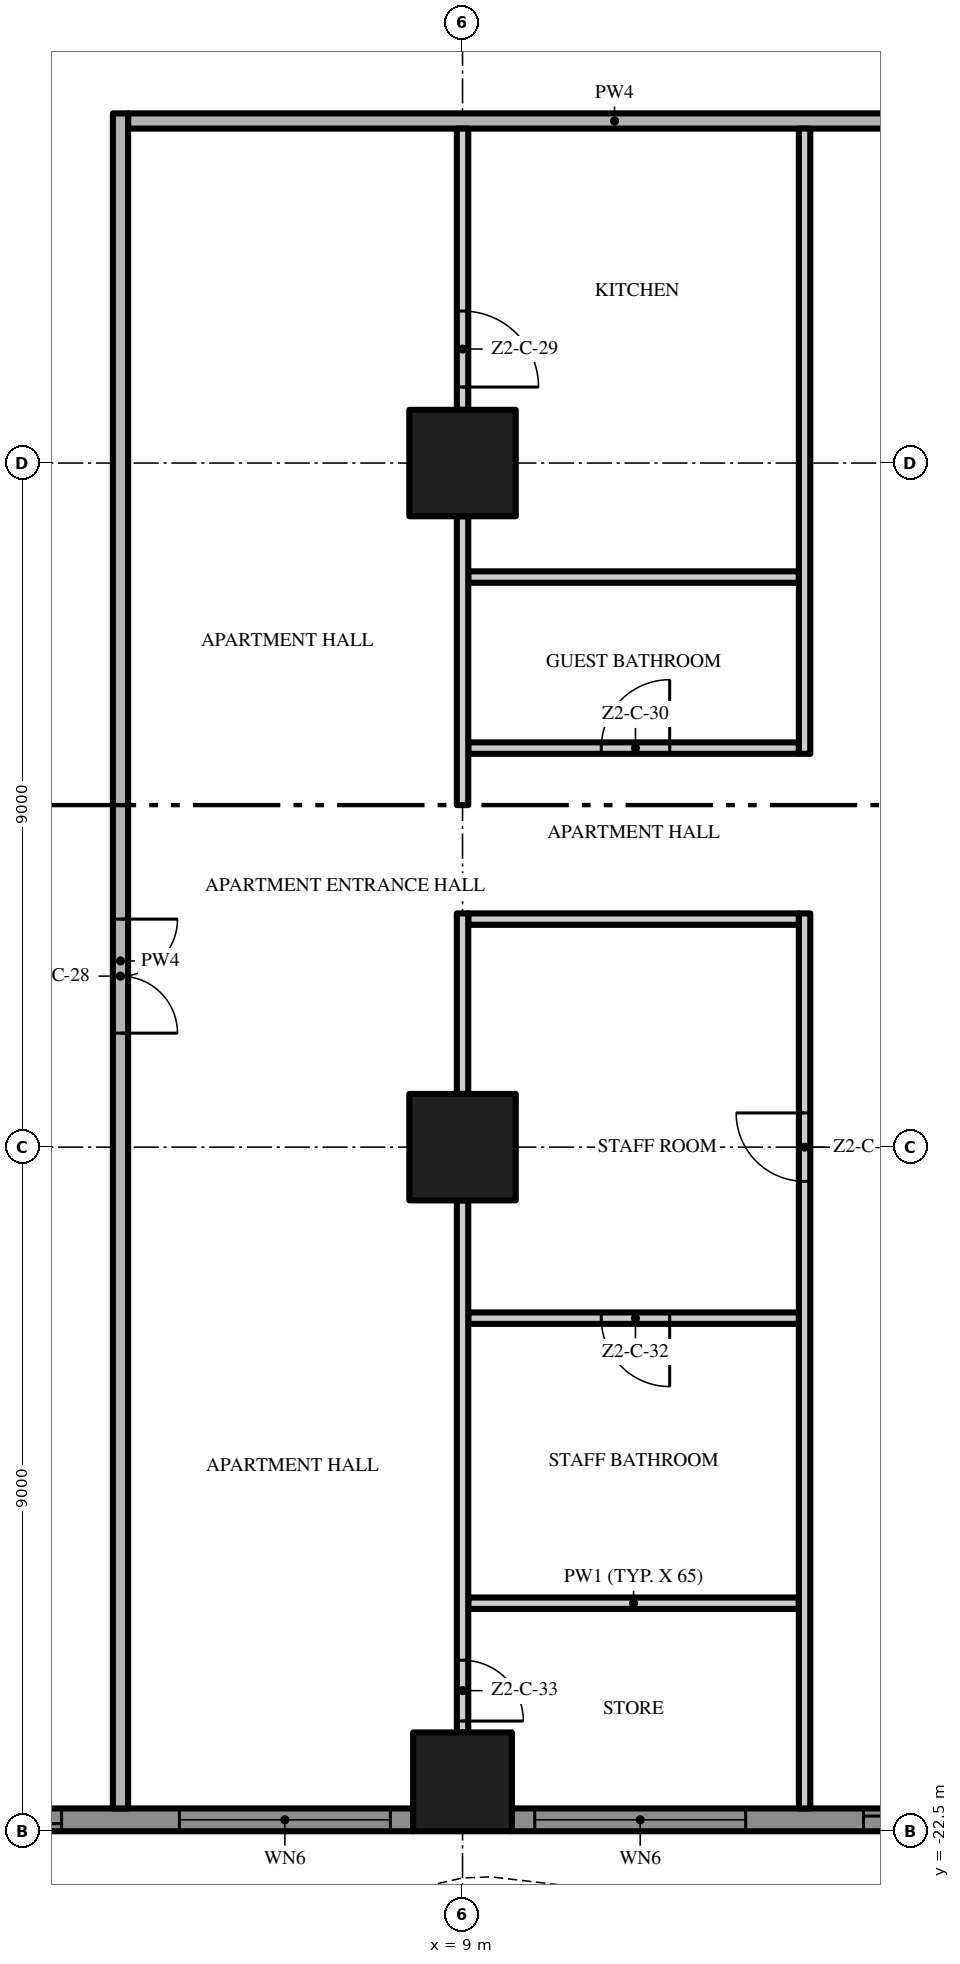
"""IFC4 building model, lengths in metres.
Left out: names, types, materials, properties, quantities, classifications, styles, units other than length and angle.
Written with IfcOpenShell. Run it as: python <this file> out.ifc"""

import sys

from ifc_helpers import new_model, si_unit, direction, frame, frame_2d, origin, origin_2d, place, context, subcontext, project, spatial, polyline, rectangle, outline, extrude, element, fill, save


model = new_model("IFC4")
c1 = context("Model", 3, precision=1e-05, world=origin(), true_north=direction((0.0, 1.0)))
c2 = subcontext(c1, "Body", "Model", "MODEL_VIEW")
j1 = project(units=[si_unit("LENGTHUNIT", "METRE"), si_unit("PLANEANGLEUNIT", "RADIAN")], contexts=[c1])
p1 = place(None, origin())
s1 = spatial("IfcSite", under=j1, at=p1, CompositionType="ELEMENT")
p2 = place(p1, origin())
s2 = spatial("IfcBuilding", under=s1, at=p2, CompositionType="ELEMENT")
p3 = place(p2, frame((0.0, 0.0, 96.0)))
s3 = spatial("IfcBuildingStorey", under=s2, at=p3, CompositionType="ELEMENT", Elevation=96.0)
p4 = place(p3, frame((9.0, -13.5, 0.0), z_axis=(0.0, 0.0, 1.0), x_axis=(1.0, 0.0, 0.0)))
e1 = element("IfcColumn", 1, at=p4, inside=s3, PredefinedType="COLUMN", context=c2, shape_type="SweptSolid", body=[
    extrude(rectangle(XDim=1.4, YDim=1.4, at=origin_2d()), origin(), (0.0, 0.0, 1.0), 3.5),
])
p5 = place(p3, frame((9.0, -21.85, 0.0), z_axis=(0.0, 0.0, 1.0), x_axis=(1.0, 0.0, 0.0)))
e2 = element("IfcColumn", 2, at=p5, inside=s3, PredefinedType="COLUMN", context=c2, shape_type="SweptSolid", body=[
    extrude(rectangle(XDim=1.3, YDim=1.3, at=origin_2d()), origin(), (0.0, 0.0, 1.0), 3.5),
])
p6 = place(p3, frame((9.0, -4.5, 0.0), z_axis=(0.0, 0.0, 1.0), x_axis=(1.0, 0.0, 0.0)))
e3 = element("IfcColumn", 3, at=p6, inside=s3, PredefinedType="COLUMN", context=c2, shape_type="SweptSolid", body=[
    extrude(rectangle(XDim=1.4, YDim=1.4, at=origin_2d()), origin(), (0.0, 0.0, 1.0), 3.5),
])
p7 = place(p3, frame((8.35, -22.35, 0.0), z_axis=(0.0, 0.0, 1.0), x_axis=(-1.0, 0.0, 0.0)))
e4 = element("IfcWall", 4, at=p7, inside=s3, PredefinedType="SOLIDWALL", context=c2, shape_type="SweptSolid", body=[
    extrude(rectangle(XDim=7.7, YDim=0.3, at=frame_2d((3.85, 0.0))), origin(), (0.0, 0.0, 1.0), 3.5),
])
p8 = place(p7, frame((4.625, 0.0, 0.0)))
e5 = element("IfcOpeningElement", 5, at=p8, cuts=e4, PredefinedType="OPENING", context=c2, shape_type="SweptSolid", body=[
    extrude(rectangle(XDim=2.775, YDim=2.4, at=frame_2d((1.387, 1.2))), frame((0.0, 0.16, 0.0), z_axis=(0.0, -1.0, 0.0), x_axis=(1.0, 0.0, 0.0)), (0.0, 0.0, 1.0), 0.32),
])
p9 = place(p7, frame((0.3, 0.0, 0.45)))
e6 = element("IfcOpeningElement", 6, at=p9, cuts=e4, PredefinedType="OPENING", context=c2, shape_type="SweptSolid", body=[
    extrude(rectangle(XDim=2.775, YDim=2.65, at=frame_2d((1.387, 1.325))), frame((0.0, 0.16, 0.0), z_axis=(0.0, -1.0, 0.0), x_axis=(1.0, 0.0, 0.0)), (0.0, 0.0, 1.0), 0.32),
])
p10 = place(p3, frame((17.35, -22.35, 0.0), z_axis=(0.0, 0.0, 1.0), x_axis=(-1.0, 0.0, 0.0)))
e7 = element("IfcWall", 7, at=p10, inside=s3, PredefinedType="SOLIDWALL", context=c2, shape_type="SweptSolid", body=[
    extrude(rectangle(XDim=7.7, YDim=0.3, at=frame_2d((3.85, 0.0))), origin(), (0.0, 0.0, 1.0), 3.5),
])
p11 = place(p10, frame((4.625, 0.0, 0.45)))
e8 = element("IfcOpeningElement", 8, at=p11, cuts=e7, PredefinedType="OPENING", context=c2, shape_type="SweptSolid", body=[
    extrude(rectangle(XDim=2.775, YDim=2.65, at=frame_2d((1.387, 1.325))), frame((0.0, 0.16, 0.0), z_axis=(0.0, -1.0, 0.0), x_axis=(1.0, 0.0, 0.0)), (0.0, 0.0, 1.0), 0.32),
])
p12 = place(p10, frame((0.3, 0.0, 0.0)))
e9 = element("IfcOpeningElement", 9, at=p12, cuts=e7, PredefinedType="OPENING", context=c2, shape_type="SweptSolid", body=[
    extrude(rectangle(XDim=2.775, YDim=2.4, at=frame_2d((1.387, 1.2))), frame((0.0, 0.16, 0.0), z_axis=(0.0, -1.0, 0.0), x_axis=(1.0, 0.0, 0.0)), (0.0, 0.0, 1.0), 0.32),
])
p13 = place(p3, origin())
e10 = element("IfcWall", 10, at=p13, inside=s3, PredefinedType="USERDEFINED", context=c2, shape_type="SweptSolid", body=[
    extrude(outline(polyline([(-22.5, -23.451), (-21.0, -23.115), (-20.625, -23.1), (-19.5, -23.231), (-18.0, -23.755), (-16.5, -24.488), (-15.0, -25.149), (-13.5, -25.485), (-13.125, -25.5), (-12.0, -25.369), (-10.5, -24.845), (-9.0, -24.112), (-7.5, -23.451), (-6.0, -23.115), (-5.625, -23.1), (-4.5, -23.231), (-3.0, -23.755), (-1.5, -24.488), (0.0, -25.149), (1.5, -25.485), (1.875, -25.5), (3.0, -25.369), (4.5, -24.845), (6.0, -24.112), (7.5, -23.451), (9.0, -23.115), (9.375, -23.1), (10.5, -23.231), (12.0, -23.755), (13.5, -24.488), (15.0, -25.149), (16.5, -25.485), (16.875, -25.5), (18.0, -25.369), (19.5, -24.845), (21.0, -24.112), (22.5, -23.451), (22.399, -23.223), (20.895, -23.885), (19.404, -24.614), (17.944, -25.124), (16.865, -25.249), (16.533, -25.236), (15.079, -24.91), (13.605, -24.261), (12.096, -23.524), (10.556, -22.986), (9.385, -22.849), (8.967, -22.866), (7.421, -23.213), (5.895, -23.885), (4.404, -24.614), (2.944, -25.124), (1.865, -25.249), (1.533, -25.236), (0.079, -24.91), (-1.395, -24.261), (-2.904, -23.524), (-4.444, -22.986), (-5.615, -22.849), (-6.033, -22.866), (-7.579, -23.213), (-9.105, -23.885), (-10.596, -24.614), (-12.056, -25.124), (-13.135, -25.249), (-13.467, -25.236), (-14.921, -24.91), (-16.395, -24.261), (-17.904, -23.524), (-19.444, -22.986), (-20.615, -22.849), (-21.033, -22.866), (-22.555, -23.208), (-22.5, -23.451)])), origin(), (0.0, 0.0, 1.0), 0.9),
])
p14 = place(p3, frame((9.075, -19.5, 0.0), z_axis=(0.0, 0.0, 1.0), x_axis=(1.0, 0.0, 0.0)))
e11 = element("IfcWall", 11, at=p14, inside=s3, PredefinedType="PARTITIONING", context=c2, shape_type="SweptSolid", body=[
    extrude(rectangle(XDim=4.35, YDim=0.15, at=frame_2d((2.175, 0.0))), origin(), (0.0, 0.0, 1.0), 3.5),
])
p15 = place(p3, frame((13.425, -15.75, 0.0), z_axis=(0.0, 0.0, 1.0), x_axis=(-1.0, 0.0, 0.0)))
e12 = element("IfcWall", 12, at=p15, inside=s3, PredefinedType="PARTITIONING", context=c2, shape_type="SweptSolid", body=[
    extrude(rectangle(XDim=4.35, YDim=0.15, at=frame_2d((2.175, 0.0))), origin(), (0.0, 0.0, 1.0), 3.5),
])
p16 = place(p15, frame((1.7, 0.0, 0.0)))
e13 = element("IfcOpeningElement", 13, at=p16, cuts=e12, PredefinedType="OPENING", context=c2, shape_type="SweptSolid", body=[
    extrude(rectangle(XDim=0.9, YDim=2.1, at=frame_2d((0.45, 1.05))), frame((0.0, 0.085, 0.0), z_axis=(0.0, -1.0, 0.0), x_axis=(1.0, 0.0, 0.0)), (0.0, 0.0, 1.0), 0.17),
])
p17 = place(p3, frame((9.075, -10.5, 0.0), z_axis=(0.0, 0.0, 1.0), x_axis=(1.0, 0.0, 0.0)))
e14 = element("IfcWall", 14, at=p17, inside=s3, PredefinedType="PARTITIONING", context=c2, shape_type="SweptSolid", body=[
    extrude(rectangle(XDim=4.35, YDim=0.15, at=frame_2d((2.175, 0.0))), origin(), (0.0, 0.0, 1.0), 3.5),
])
p18 = place(p3, frame((9.075, -8.25, 0.0), z_axis=(0.0, 0.0, 1.0), x_axis=(1.0, 0.0, 0.0)))
e15 = element("IfcWall", 15, at=p18, inside=s3, PredefinedType="PARTITIONING", context=c2, shape_type="SweptSolid", body=[
    extrude(rectangle(XDim=4.35, YDim=0.15, at=frame_2d((2.175, 0.0))), origin(), (0.0, 0.0, 1.0), 3.5),
])
p19 = place(p18, frame((1.75, 0.0, 0.0)))
e16 = element("IfcOpeningElement", 16, at=p19, cuts=e15, PredefinedType="OPENING", context=c2, shape_type="SweptSolid", body=[
    extrude(rectangle(XDim=0.9, YDim=2.1, at=frame_2d((0.45, 1.05))), frame((0.0, 0.085, 0.0), z_axis=(0.0, -1.0, 0.0), x_axis=(1.0, 0.0, 0.0)), (0.0, 0.0, 1.0), 0.17),
])
p20 = place(p3, frame((9.075, -6.0, 0.0), z_axis=(0.0, 0.0, 1.0), x_axis=(1.0, 0.0, 0.0)))
e17 = element("IfcWall", 17, at=p20, inside=s3, PredefinedType="PARTITIONING", context=c2, shape_type="SweptSolid", body=[
    extrude(rectangle(XDim=4.35, YDim=0.15, at=frame_2d((2.175, 0.0))), origin(), (0.0, 0.0, 1.0), 3.5),
])
p21 = place(p3, frame((4.6, 0.0, 0.0), z_axis=(0.0, 0.0, 1.0), x_axis=(1.0, 0.0, 0.0)))
e18 = element("IfcWall", 18, at=p21, inside=s3, PredefinedType="PARTITIONING", context=c2, shape_type="SweptSolid", body=[
    extrude(rectangle(XDim=12.8, YDim=0.2, at=frame_2d((6.4, 0.0))), origin(), (0.0, 0.0, 1.0), 3.5),
])
p22 = place(p3, frame((4.5, 0.1, 0.0), z_axis=(0.0, 0.0, 1.0), x_axis=(0.0, -1.0, 0.0)))
e19 = element("IfcWall", 19, at=p22, inside=s3, PredefinedType="PARTITIONING", context=c2, shape_type="SweptSolid", body=[
    extrude(rectangle(XDim=22.3, YDim=0.2, at=frame_2d((11.15, 0.0))), origin(), (0.0, 0.0, 1.0), 3.5),
])
p23 = place(p22, frame((10.6, 0.0, 0.0)))
e20 = element("IfcOpeningElement", 20, at=p23, cuts=e19, PredefinedType="OPENING", context=c2, shape_type="SweptSolid", body=[
    extrude(rectangle(XDim=1.5, YDim=2.4, at=frame_2d((0.75, 1.2))), frame((0.0, 0.11, 0.0), z_axis=(0.0, -1.0, 0.0), x_axis=(1.0, 0.0, 0.0)), (0.0, 0.0, 1.0), 0.22),
])
p24 = place(p3, frame((9.0, -14.2, 0.0), z_axis=(0.0, 0.0, 1.0), x_axis=(0.0, -1.0, 0.0)))
e21 = element("IfcWall", 21, at=p24, inside=s3, PredefinedType="PARTITIONING", context=c2, shape_type="SweptSolid", body=[
    extrude(rectangle(XDim=7.0, YDim=0.15, at=frame_2d((3.5, 0.0))), origin(), (0.0, 0.0, 1.0), 3.5),
])
p25 = place(p24, frame((6.05, 0.0, 0.0)))
e22 = element("IfcOpeningElement", 22, at=p25, cuts=e21, PredefinedType="OPENING", context=c2, shape_type="SweptSolid", body=[
    extrude(rectangle(XDim=0.8, YDim=2.0, at=frame_2d((0.4, 1.0))), frame((0.0, 0.085, 0.0), z_axis=(0.0, -1.0, 0.0), x_axis=(1.0, 0.0, 0.0)), (0.0, 0.0, 1.0), 0.17),
])
p26 = place(p3, frame((9.0, -12.8, 0.0), z_axis=(0.0, 0.0, 1.0), x_axis=(0.0, 1.0, 0.0)))
e23 = element("IfcWall", 23, at=p26, inside=s3, PredefinedType="PARTITIONING", context=c2, shape_type="SweptSolid", body=[
    extrude(rectangle(XDim=2.375, YDim=0.15, at=frame_2d((1.188, 0.0))), origin(), (0.0, 0.0, 1.0), 3.5),
])
p27 = place(p3, frame((9.0, -9.0, 0.0), z_axis=(0.0, 0.0, 1.0), x_axis=(0.0, 1.0, 0.0)))
e24 = element("IfcWall", 24, at=p27, inside=s3, PredefinedType="PARTITIONING", context=c2, shape_type="SweptSolid", body=[
    extrude(rectangle(XDim=3.8, YDim=0.15, at=frame_2d((1.9, 0.0))), origin(), (0.0, 0.0, 1.0), 3.5),
])
p28 = place(p3, frame((9.0, -0.1, 0.0), z_axis=(0.0, 0.0, 1.0), x_axis=(0.0, -1.0, 0.0)))
e25 = element("IfcWall", 25, at=p28, inside=s3, PredefinedType="PARTITIONING", context=c2, shape_type="SweptSolid", body=[
    extrude(rectangle(XDim=3.7, YDim=0.15, at=frame_2d((1.85, 0.0))), origin(), (0.0, 0.0, 1.0), 3.5),
])
p29 = place(p28, frame((2.4, 0.0, 0.0)))
e26 = element("IfcOpeningElement", 26, at=p29, cuts=e25, PredefinedType="OPENING", context=c2, shape_type="SweptSolid", body=[
    extrude(rectangle(XDim=1.0, YDim=2.4, at=frame_2d((0.5, 1.2))), frame((0.0, 0.085, 0.0), z_axis=(0.0, -1.0, 0.0), x_axis=(1.0, 0.0, 0.0)), (0.0, 0.0, 1.0), 0.17),
])
p30 = place(p3, frame((13.5, -22.2, 0.0), z_axis=(0.0, 0.0, 1.0), x_axis=(0.0, 1.0, 0.0)))
e27 = element("IfcWall", 27, at=p30, inside=s3, PredefinedType="PARTITIONING", context=c2, shape_type="SweptSolid", body=[
    extrude(rectangle(XDim=11.775, YDim=0.15, at=frame_2d((5.888, 0.0))), origin(), (0.0, 0.0, 1.0), 3.5),
])
p31 = place(p30, frame((8.25, 0.0, 0.0)))
e28 = element("IfcOpeningElement", 28, at=p31, cuts=e27, PredefinedType="OPENING", context=c2, shape_type="SweptSolid", body=[
    extrude(rectangle(XDim=0.9, YDim=2.1, at=frame_2d((0.45, 1.05))), frame((0.0, 0.085, 0.0), z_axis=(0.0, -1.0, 0.0), x_axis=(1.0, 0.0, 0.0)), (0.0, 0.0, 1.0), 0.17),
])
p32 = place(p3, frame((13.5, -8.325, 0.0), z_axis=(0.0, 0.0, 1.0), x_axis=(0.0, 1.0, 0.0)))
e29 = element("IfcWall", 29, at=p32, inside=s3, PredefinedType="PARTITIONING", context=c2, shape_type="SweptSolid", body=[
    extrude(rectangle(XDim=8.225, YDim=0.15, at=frame_2d((4.112, 0.0))), origin(), (0.0, 0.0, 1.0), 3.5),
])
p33 = place(p8, origin())
e30 = element("IfcDoor", 30, at=p33, inside=s3, OperationType="SINGLE_SWING_LEFT", PredefinedType="DOOR", context=c2, shape_type="SweptSolid", body=[
    extrude(rectangle(XDim=2.775, YDim=2.4, at=frame_2d((1.387, 1.2))), frame((0.0, 0.025, 0.0), z_axis=(0.0, -1.0, 0.0), x_axis=(1.0, 0.0, 0.0)), (0.0, 0.0, 1.0), 0.05),
])
fill(e5, e30)
p34 = place(p9, origin())
e31 = element("IfcWindow", 31, at=p34, inside=s3, PartitioningType="SINGLE_PANEL", PredefinedType="WINDOW", context=c2, shape_type="SweptSolid", body=[
    extrude(rectangle(XDim=2.775, YDim=2.65, at=frame_2d((1.387, 1.325))), frame((0.0, 0.03, 0.0), z_axis=(0.0, -1.0, 0.0), x_axis=(1.0, 0.0, 0.0)), (0.0, 0.0, 1.0), 0.06),
])
fill(e6, e31)
p35 = place(p11, origin())
e32 = element("IfcWindow", 32, at=p35, inside=s3, PartitioningType="SINGLE_PANEL", PredefinedType="WINDOW", context=c2, shape_type="SweptSolid", body=[
    extrude(rectangle(XDim=2.775, YDim=2.65, at=frame_2d((1.387, 1.325))), frame((0.0, 0.03, 0.0), z_axis=(0.0, -1.0, 0.0), x_axis=(1.0, 0.0, 0.0)), (0.0, 0.0, 1.0), 0.06),
])
fill(e8, e32)
p36 = place(p12, origin())
e33 = element("IfcDoor", 33, at=p36, inside=s3, OperationType="SINGLE_SWING_LEFT", PredefinedType="DOOR", context=c2, shape_type="SweptSolid", body=[
    extrude(rectangle(XDim=2.775, YDim=2.4, at=frame_2d((1.387, 1.2))), frame((0.0, 0.025, 0.0), z_axis=(0.0, -1.0, 0.0), x_axis=(1.0, 0.0, 0.0)), (0.0, 0.0, 1.0), 0.05),
])
fill(e9, e33)
p37 = place(p23, origin())
e34 = element("IfcDoor", 34, at=p37, inside=s3, OperationType="DOUBLE_DOOR_SINGLE_SWING", PredefinedType="DOOR", context=c2, shape_type="SweptSolid", body=[
    extrude(rectangle(XDim=1.5, YDim=2.4, at=frame_2d((0.75, 1.2))), frame((0.0, 0.025, 0.0), z_axis=(0.0, -1.0, 0.0), x_axis=(1.0, 0.0, 0.0)), (0.0, 0.0, 1.0), 0.05),
])
fill(e20, e34)
p38 = place(p29, origin())
e35 = element("IfcDoor", 35, at=p38, inside=s3, OperationType="SINGLE_SWING_RIGHT", PredefinedType="DOOR", context=c2, shape_type="SweptSolid", body=[
    extrude(rectangle(XDim=1.0, YDim=2.4, at=frame_2d((0.5, 1.2))), frame((0.0, 0.025, 0.0), z_axis=(0.0, -1.0, 0.0), x_axis=(1.0, 0.0, 0.0)), (0.0, 0.0, 1.0), 0.05),
])
fill(e26, e35)
p39 = place(p19, origin())
e36 = element("IfcDoor", 36, at=p39, inside=s3, OperationType="SINGLE_SWING_RIGHT", PredefinedType="DOOR", context=c2, shape_type="SweptSolid", body=[
    extrude(rectangle(XDim=0.9, YDim=2.1, at=frame_2d((0.45, 1.05))), frame((0.0, 0.025, 0.0), z_axis=(0.0, -1.0, 0.0), x_axis=(1.0, 0.0, 0.0)), (0.0, 0.0, 1.0), 0.05),
])
fill(e16, e36)
p40 = place(p31, origin())
e37 = element("IfcDoor", 37, at=p40, inside=s3, OperationType="SINGLE_SWING_RIGHT", PredefinedType="DOOR", context=c2, shape_type="SweptSolid", body=[
    extrude(rectangle(XDim=0.9, YDim=2.1, at=frame_2d((0.45, 1.05))), frame((0.0, 0.025, 0.0), z_axis=(0.0, -1.0, 0.0), x_axis=(1.0, 0.0, 0.0)), (0.0, 0.0, 1.0), 0.05),
])
fill(e28, e37)
p41 = place(p16, origin())
e38 = element("IfcDoor", 38, at=p41, inside=s3, OperationType="SINGLE_SWING_LEFT", PredefinedType="DOOR", context=c2, shape_type="SweptSolid", body=[
    extrude(rectangle(XDim=0.9, YDim=2.1, at=frame_2d((0.45, 1.05))), frame((0.0, 0.025, 0.0), z_axis=(0.0, -1.0, 0.0), x_axis=(1.0, 0.0, 0.0)), (0.0, 0.0, 1.0), 0.05),
])
fill(e13, e38)
p42 = place(p25, origin())
e39 = element("IfcDoor", 39, at=p42, inside=s3, OperationType="SINGLE_SWING_RIGHT", PredefinedType="DOOR", context=c2, shape_type="SweptSolid", body=[
    extrude(rectangle(XDim=0.8, YDim=2.0, at=frame_2d((0.4, 1.0))), frame((0.0, 0.025, 0.0), z_axis=(0.0, -1.0, 0.0), x_axis=(1.0, 0.0, 0.0)), (0.0, 0.0, 1.0), 0.05),
])
fill(e22, e39)
save(model, sys.argv[1])
